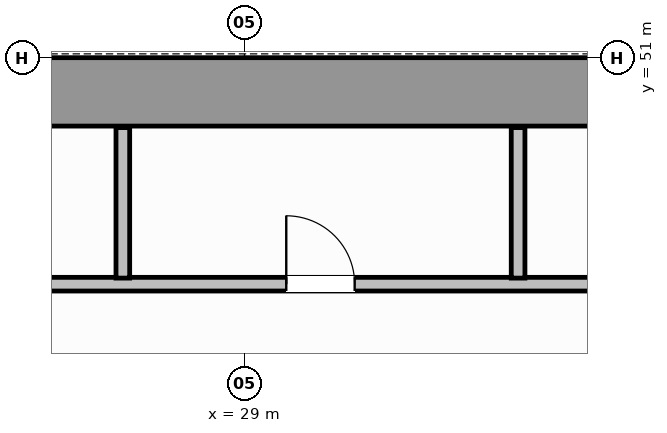
"""IFC4 building model, lengths in metres.
Left out: names, types, materials, properties, quantities, classifications, styles, units other than length and angle.
Written with IfcOpenShell. Run it as: python <this file> out.ifc"""

import sys

from ifc_helpers import new_model, si_unit, direction, frame, frame_2d, origin, place, context, subcontext, project, spatial, rectangle, extrude, source, transform, mapped, element, fill, save


model = new_model("IFC4")
c1 = context("Model", 3, precision=1e-05, world=origin(), true_north=direction((0.0, 1.0)))
c2 = subcontext(c1, "Body", "Model", "MODEL_VIEW")
j1 = project(units=[si_unit("LENGTHUNIT", "METRE"), si_unit("PLANEANGLEUNIT", "RADIAN")], contexts=[c1])
p1 = place(None, origin())
s1 = spatial("IfcSite", under=j1, at=p1, CompositionType="ELEMENT")
p2 = place(p1, origin())
s2 = spatial("IfcBuilding", under=s1, at=p2, CompositionType="ELEMENT")
p3 = place(p2, frame((0.0, 0.0, 79.6)))
s3 = spatial("IfcBuildingStorey", under=s2, at=p3, CompositionType="ELEMENT", Elevation=79.6)
p4 = place(p3, frame((14.454, 50.55, 0.0), z_axis=(0.0, 0.0, 1.0), x_axis=(1.0, 0.0, 0.0)))
e1 = element("IfcWall", 1, at=p4, inside=s3, PredefinedType="SHEAR", context=c2, shape_type="SweptSolid", body=[
    extrude(rectangle(XDim=19.544, YDim=0.9, at=frame_2d((9.772, 0.0))), origin(), (0.0, 0.0, 1.0), 3.8),
])
p5 = place(p3, frame((18.62, 48.02, 0.0), z_axis=(0.0, 0.0, 1.0), x_axis=(1.0, 0.0, 0.0)))
e2 = element("IfcWall", 2, at=p5, inside=s3, PredefinedType="PLUMBINGWALL", context=c2, shape_type="SweptSolid", body=[
    extrude(rectangle(XDim=30.76, YDim=0.18, at=frame_2d((15.38, 0.0))), origin(), (0.0, 0.0, 1.0), 3.54),
])
p6 = place(p5, frame((1.655, 0.0, 0.0)))
e3 = element("IfcOpeningElement", 3, at=p6, cuts=e2, PredefinedType="OPENING", context=c2, shape_type="SweptSolid", body=[
    extrude(rectangle(XDim=0.9, YDim=2.15, at=frame_2d((0.45, 1.075))), frame((0.0, 0.1, 0.0), z_axis=(0.0, -1.0, 0.0), x_axis=(1.0, 0.0, 0.0)), (0.0, 0.0, 1.0), 0.2),
])
p7 = place(p5, frame((6.03, 0.0, 0.0)))
e4 = element("IfcOpeningElement", 4, at=p7, cuts=e2, PredefinedType="OPENING", context=c2, shape_type="SweptSolid", body=[
    extrude(rectangle(XDim=0.9, YDim=2.15, at=frame_2d((0.45, 1.075))), frame((0.0, 0.1, 0.0), z_axis=(0.0, -1.0, 0.0), x_axis=(1.0, 0.0, 0.0)), (0.0, 0.0, 1.0), 0.2),
])
p8 = place(p5, frame((10.93, 0.0, 0.0)))
e5 = element("IfcOpeningElement", 5, at=p8, cuts=e2, PredefinedType="OPENING", context=c2, shape_type="SweptSolid", body=[
    extrude(rectangle(XDim=0.9, YDim=2.15, at=frame_2d((0.45, 1.075))), frame((0.0, 0.1, 0.0), z_axis=(0.0, -1.0, 0.0), x_axis=(1.0, 0.0, 0.0)), (0.0, 0.0, 1.0), 0.2),
])
p9 = place(p5, frame((16.13, 0.0, 0.0)))
e6 = element("IfcOpeningElement", 6, at=p9, cuts=e2, PredefinedType="OPENING", context=c2, shape_type="SweptSolid", body=[
    extrude(rectangle(XDim=0.9, YDim=2.15, at=frame_2d((0.45, 1.075))), frame((0.0, 0.1, 0.0), z_axis=(0.0, -1.0, 0.0), x_axis=(1.0, 0.0, 0.0)), (0.0, 0.0, 1.0), 0.2),
])
p10 = place(p5, frame((21.73, 0.0, 0.0)))
e7 = element("IfcOpeningElement", 7, at=p10, cuts=e2, PredefinedType="OPENING", context=c2, shape_type="SweptSolid", body=[
    extrude(rectangle(XDim=0.9, YDim=2.15, at=frame_2d((0.45, 1.075))), frame((0.0, 0.1, 0.0), z_axis=(0.0, -1.0, 0.0), x_axis=(1.0, 0.0, 0.0)), (0.0, 0.0, 1.0), 0.2),
])
p11 = place(p5, frame((27.505, 0.0, 0.0)))
e8 = element("IfcOpeningElement", 8, at=p11, cuts=e2, PredefinedType="OPENING", context=c2, shape_type="SweptSolid", body=[
    extrude(rectangle(XDim=0.9, YDim=2.15, at=frame_2d((0.45, 1.075))), frame((0.0, 0.1, 0.0), z_axis=(0.0, -1.0, 0.0), x_axis=(1.0, 0.0, 0.0)), (0.0, 0.0, 1.0), 0.2),
])
for number, where, z_axis, x_axis in (
    (9, (27.4, 48.1, 0.0), (0.0, 0.0, 1.0), (0.0, 1.0, 0.0)),
    (10, (32.6, 48.1, 0.0), (0.0, 0.0, 1.0), (0.0, 1.0, 0.0)),
):
    element("IfcWall", number, at=place(p3, frame(where, z_axis=z_axis, x_axis=x_axis)), inside=s3, PredefinedType="PLUMBINGWALL", context=c2, shape_type="SweptSolid", body=[
        extrude(rectangle(XDim=1.98, YDim=0.18, at=frame_2d((0.99, 0.0))), origin(), (0.0, 0.0, 1.0), 3.54),
    ])
m1 = source(origin(), c2, "Body", "SweptSolid", [
    extrude(rectangle(XDim=0.9, YDim=2.15, at=frame_2d((0.45, 1.075))), frame((0.0, 0.025, 0.0), z_axis=(0.0, -1.0, 0.0), x_axis=(1.0, 0.0, 0.0)), (0.0, 0.0, 1.0), 0.05),
])
p12 = place(p8, origin())
e11 = element("IfcDoor", 11, at=p12, inside=s3, OperationType="SINGLE_SWING_LEFT", PredefinedType="DOOR", context=c2, shape_type="MappedRepresentation", body=[
    mapped(m1, transform((0.0, 0.0, 0.0), scale=1.0)),
])
fill(e5, e11)
save(model, sys.argv[1])
